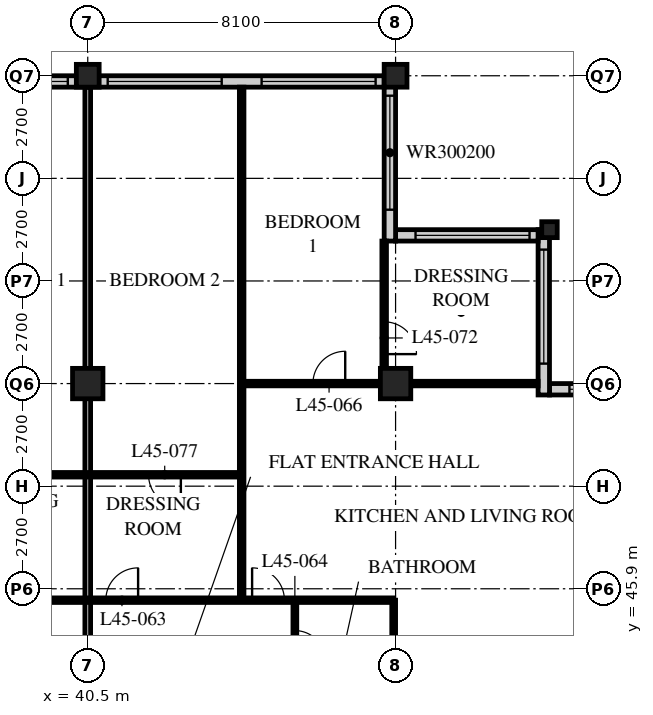
"""IFC4 building model, lengths in metres.
Left out: names, types, materials, properties, quantities, classifications, styles, units other than length and angle.
Written with IfcOpenShell. Run it as: python <this file> out.ifc"""

import sys

from ifc_helpers import new_model, si_unit, direction, frame, frame_2d, origin, origin_2d, place, context, subcontext, project, spatial, rectangle, hollow_rectangle, i_section, extrude, element, fill, save


model = new_model("IFC4")
c1 = context("Model", 3, precision=1e-05, world=origin(), true_north=direction((0.0, 1.0)))
c2 = subcontext(c1, "Body", "Model", "MODEL_VIEW")
j1 = project(units=[si_unit("LENGTHUNIT", "METRE"), si_unit("PLANEANGLEUNIT", "RADIAN")], contexts=[c1])
p1 = place(None, origin())
s1 = spatial("IfcSite", under=j1, at=p1, CompositionType="ELEMENT")
p2 = place(p1, origin())
s2 = spatial("IfcBuilding", under=s1, at=p2, CompositionType="ELEMENT")
p3 = place(p2, frame((0.0, 0.0, 177.6)))
s3 = spatial("IfcBuildingStorey", under=s2, at=p3, CompositionType="ELEMENT", Elevation=177.6)
p4 = place(p3, frame((40.5, 51.3, 0.0), z_axis=(0.0, 0.0, 1.0), x_axis=(1.0, 0.0, 0.0)))
e1 = element("IfcColumn", 1, at=p4, inside=s3, PredefinedType="COLUMN", context=c2, shape_type="SweptSolid", body=[
    extrude(hollow_rectangle(XDim=0.8, YDim=0.8, WallThickness=0.08, at=origin_2d()), origin(), (0.0, 0.0, 1.0), 3.6),
])
p5 = place(p3, frame((40.5, 59.4, 0.0), z_axis=(0.0, 0.0, 1.0), x_axis=(1.0, 0.0, 0.0)))
e2 = element("IfcColumn", 2, at=p5, inside=s3, PredefinedType="COLUMN", context=c2, shape_type="SweptSolid", body=[
    extrude(hollow_rectangle(XDim=0.6, YDim=0.6, WallThickness=0.05, at=origin_2d()), origin(), (0.0, 0.0, 1.0), 3.6),
])
p6 = place(p3, frame((48.6, 51.3, 0.0), z_axis=(0.0, 0.0, 1.0), x_axis=(1.0, 0.0, 0.0)))
e3 = element("IfcColumn", 3, at=p6, inside=s3, PredefinedType="COLUMN", context=c2, shape_type="SweptSolid", body=[
    extrude(hollow_rectangle(XDim=0.8, YDim=0.8, WallThickness=0.08, at=origin_2d()), origin(), (0.0, 0.0, 1.0), 3.6),
])
p7 = place(p3, frame((48.6, 59.4, 0.0), z_axis=(0.0, 0.0, 1.0), x_axis=(1.0, 0.0, 0.0)))
e4 = element("IfcColumn", 4, at=p7, inside=s3, PredefinedType="COLUMN", context=c2, shape_type="SweptSolid", body=[
    extrude(hollow_rectangle(XDim=0.6, YDim=0.6, WallThickness=0.05, at=origin_2d()), origin(), (0.0, 0.0, 1.0), 3.6),
])
p8 = place(p3, frame((52.65, 55.35, 0.0), z_axis=(0.0, 0.0, 1.0), x_axis=(1.0, 0.0, 0.0)))
e5 = element("IfcColumn", 5, at=p8, inside=s3, PredefinedType="COLUMN", context=c2, shape_type="SweptSolid", body=[
    extrude(i_section(OverallWidth=0.407, OverallDepth=0.419, WebThickness=0.031, FlangeThickness=0.049, FilletRadius=0.015, at=origin_2d()), origin(), (0.0, 0.0, 1.0), 3.6),
])
p9 = place(p3, frame((56.4, 51.15, 0.0), z_axis=(0.0, 0.0, 1.0), x_axis=(-1.0, 0.0, 0.0)))
e6 = element("IfcWall", 6, at=p9, inside=s3, PredefinedType="SOLIDWALL", context=c2, shape_type="SweptSolid", body=[
    extrude(rectangle(XDim=3.75, YDim=0.3, at=frame_2d((1.875, 0.0))), origin(), (0.0, 0.0, 1.0), 3.39),
])
p10 = place(p9, frame((0.225, 0.0, 0.6)))
e7 = element("IfcOpeningElement", 7, at=p10, cuts=e6, PredefinedType="OPENING", context=c2, shape_type="SweptSolid", body=[
    extrude(rectangle(XDim=3.0, YDim=2.0, at=frame_2d((1.5, 1.0))), frame((0.0, 0.16, 0.0), z_axis=(0.0, -1.0, 0.0), x_axis=(1.0, 0.0, 0.0)), (0.0, 0.0, 1.0), 0.32),
])
p11 = place(p3, frame((52.5, 51.0, 0.0), z_axis=(0.0, 0.0, 1.0), x_axis=(0.0, 1.0, 0.0)))
e8 = element("IfcWall", 8, at=p11, inside=s3, PredefinedType="SOLIDWALL", context=c2, shape_type="SweptSolid", body=[
    extrude(rectangle(XDim=4.35, YDim=0.3, at=frame_2d((2.175, 0.0))), origin(), (0.0, 0.0, 1.0), 3.39),
])
p12 = place(p11, frame((0.825, 0.0, 0.6)))
e9 = element("IfcOpeningElement", 9, at=p12, cuts=e8, PredefinedType="OPENING", context=c2, shape_type="SweptSolid", body=[
    extrude(rectangle(XDim=3.0, YDim=2.0, at=frame_2d((1.5, 1.0))), frame((0.0, 0.16, 0.0), z_axis=(0.0, -1.0, 0.0), x_axis=(1.0, 0.0, 0.0)), (0.0, 0.0, 1.0), 0.32),
])
p13 = place(p3, frame((52.35, 55.2, 0.0), z_axis=(0.0, 0.0, 1.0), x_axis=(-1.0, 0.0, 0.0)))
e10 = element("IfcWall", 10, at=p13, inside=s3, PredefinedType="SOLIDWALL", context=c2, shape_type="SweptSolid", body=[
    extrude(rectangle(XDim=3.75, YDim=0.3, at=frame_2d((1.875, 0.0))), origin(), (0.0, 0.0, 1.0), 3.39),
])
p14 = place(p13, frame((0.225, 0.0, 0.6)))
e11 = element("IfcOpeningElement", 11, at=p14, cuts=e10, PredefinedType="OPENING", context=c2, shape_type="SweptSolid", body=[
    extrude(rectangle(XDim=3.0, YDim=2.0, at=frame_2d((1.5, 1.0))), frame((0.0, 0.16, 0.0), z_axis=(0.0, -1.0, 0.0), x_axis=(1.0, 0.0, 0.0)), (0.0, 0.0, 1.0), 0.32),
])
p15 = place(p3, frame((48.45, 55.05, 0.0), z_axis=(0.0, 0.0, 1.0), x_axis=(0.0, 1.0, 0.0)))
e12 = element("IfcWall", 12, at=p15, inside=s3, PredefinedType="SOLIDWALL", context=c2, shape_type="SweptSolid", body=[
    extrude(rectangle(XDim=4.35, YDim=0.3, at=frame_2d((2.175, 0.0))), origin(), (0.0, 0.0, 1.0), 3.39),
])
p16 = place(p15, frame((0.825, 0.0, 0.6)))
e13 = element("IfcOpeningElement", 13, at=p16, cuts=e12, PredefinedType="OPENING", context=c2, shape_type="SweptSolid", body=[
    extrude(rectangle(XDim=3.0, YDim=2.0, at=frame_2d((1.5, 1.0))), frame((0.0, 0.16, 0.0), z_axis=(0.0, -1.0, 0.0), x_axis=(1.0, 0.0, 0.0)), (0.0, 0.0, 1.0), 0.32),
])
p17 = place(p3, frame((48.3, 59.25, 0.0), z_axis=(0.0, 0.0, 1.0), x_axis=(-1.0, 0.0, 0.0)))
e14 = element("IfcWall", 14, at=p17, inside=s3, PredefinedType="SOLIDWALL", context=c2, shape_type="SweptSolid", body=[
    extrude(rectangle(XDim=40.2, YDim=0.3, at=frame_2d((20.1, 0.0))), origin(), (0.0, 0.0, 1.0), 3.39),
])
p18 = place(p17, frame((0.225, 0.0, 0.6)))
e15 = element("IfcOpeningElement", 15, at=p18, cuts=e14, PredefinedType="OPENING", context=c2, shape_type="SweptSolid", body=[
    extrude(rectangle(XDim=3.0, YDim=2.4, at=frame_2d((1.5, 1.2))), frame((0.0, 0.16, 0.0), z_axis=(0.0, -1.0, 0.0), x_axis=(1.0, 0.0, 0.0)), (0.0, 0.0, 1.0), 0.32),
])
p19 = place(p17, frame((4.275, 0.0, 0.6)))
e16 = element("IfcOpeningElement", 16, at=p19, cuts=e14, PredefinedType="OPENING", context=c2, shape_type="SweptSolid", body=[
    extrude(rectangle(XDim=3.0, YDim=2.4, at=frame_2d((1.5, 1.2))), frame((0.0, 0.16, 0.0), z_axis=(0.0, -1.0, 0.0), x_axis=(1.0, 0.0, 0.0)), (0.0, 0.0, 1.0), 0.32),
])
p20 = place(p17, frame((8.325, 0.0, 0.6)))
e17 = element("IfcOpeningElement", 17, at=p20, cuts=e14, PredefinedType="OPENING", context=c2, shape_type="SweptSolid", body=[
    extrude(rectangle(XDim=3.0, YDim=2.4, at=frame_2d((1.5, 1.2))), frame((0.0, 0.16, 0.0), z_axis=(0.0, -1.0, 0.0), x_axis=(1.0, 0.0, 0.0)), (0.0, 0.0, 1.0), 0.32),
])
p21 = place(p17, frame((12.375, 0.0, 0.6)))
e18 = element("IfcOpeningElement", 18, at=p21, cuts=e14, PredefinedType="OPENING", context=c2, shape_type="SweptSolid", body=[
    extrude(rectangle(XDim=3.0, YDim=2.4, at=frame_2d((1.5, 1.2))), frame((0.0, 0.16, 0.0), z_axis=(0.0, -1.0, 0.0), x_axis=(1.0, 0.0, 0.0)), (0.0, 0.0, 1.0), 0.32),
])
p22 = place(p17, frame((16.425, 0.0, 0.6)))
e19 = element("IfcOpeningElement", 19, at=p22, cuts=e14, PredefinedType="OPENING", context=c2, shape_type="SweptSolid", body=[
    extrude(rectangle(XDim=3.0, YDim=2.4, at=frame_2d((1.5, 1.2))), frame((0.0, 0.16, 0.0), z_axis=(0.0, -1.0, 0.0), x_axis=(1.0, 0.0, 0.0)), (0.0, 0.0, 1.0), 0.32),
])
p23 = place(p17, frame((20.475, 0.0, 0.6)))
e20 = element("IfcOpeningElement", 20, at=p23, cuts=e14, PredefinedType="OPENING", context=c2, shape_type="SweptSolid", body=[
    extrude(rectangle(XDim=3.0, YDim=2.4, at=frame_2d((1.5, 1.2))), frame((0.0, 0.16, 0.0), z_axis=(0.0, -1.0, 0.0), x_axis=(1.0, 0.0, 0.0)), (0.0, 0.0, 1.0), 0.32),
])
p24 = place(p17, frame((24.525, 0.0, 0.6)))
e21 = element("IfcOpeningElement", 21, at=p24, cuts=e14, PredefinedType="OPENING", context=c2, shape_type="SweptSolid", body=[
    extrude(rectangle(XDim=3.0, YDim=2.4, at=frame_2d((1.5, 1.2))), frame((0.0, 0.16, 0.0), z_axis=(0.0, -1.0, 0.0), x_axis=(1.0, 0.0, 0.0)), (0.0, 0.0, 1.0), 0.32),
])
p25 = place(p17, frame((28.575, 0.0, 0.6)))
e22 = element("IfcOpeningElement", 22, at=p25, cuts=e14, PredefinedType="OPENING", context=c2, shape_type="SweptSolid", body=[
    extrude(rectangle(XDim=3.0, YDim=2.4, at=frame_2d((1.5, 1.2))), frame((0.0, 0.16, 0.0), z_axis=(0.0, -1.0, 0.0), x_axis=(1.0, 0.0, 0.0)), (0.0, 0.0, 1.0), 0.32),
])
p26 = place(p17, frame((32.625, 0.0, 0.6)))
e23 = element("IfcOpeningElement", 23, at=p26, cuts=e14, PredefinedType="OPENING", context=c2, shape_type="SweptSolid", body=[
    extrude(rectangle(XDim=3.0, YDim=2.4, at=frame_2d((1.5, 1.2))), frame((0.0, 0.16, 0.0), z_axis=(0.0, -1.0, 0.0), x_axis=(1.0, 0.0, 0.0)), (0.0, 0.0, 1.0), 0.32),
])
p27 = place(p17, frame((36.675, 0.0, 0.6)))
e24 = element("IfcOpeningElement", 24, at=p27, cuts=e14, PredefinedType="OPENING", context=c2, shape_type="SweptSolid", body=[
    extrude(rectangle(XDim=3.0, YDim=2.4, at=frame_2d((1.5, 1.2))), frame((0.0, 0.16, 0.0), z_axis=(0.0, -1.0, 0.0), x_axis=(1.0, 0.0, 0.0)), (0.0, 0.0, 1.0), 0.32),
])
p28 = place(p3, frame((45.95, 43.2, 0.0), z_axis=(0.0, 0.0, 1.0), x_axis=(0.0, 1.0, 0.0)))
e25 = element("IfcWall", 25, at=p28, inside=s3, PredefinedType="PARTITIONING", context=c2, shape_type="SweptSolid", body=[
    extrude(rectangle(XDim=2.4, YDim=0.1, at=frame_2d((1.2, 0.0))), origin(), (0.0, 0.0, 1.0), 3.39),
])
p29 = place(p28, frame((0.8, 0.0, 0.0)))
e26 = element("IfcOpeningElement", 26, at=p29, cuts=e25, PredefinedType="OPENING", context=c2, shape_type="SweptSolid", body=[
    extrude(rectangle(XDim=0.8, YDim=2.1, at=frame_2d((0.4, 1.05))), frame((0.0, 0.06, 0.0), z_axis=(0.0, -1.0, 0.0), x_axis=(1.0, 0.0, 0.0)), (0.0, 0.0, 1.0), 0.12),
])
p30 = place(p3, frame((48.55, 43.2, 0.0), z_axis=(0.0, 0.0, 1.0), x_axis=(0.0, 1.0, 0.0)))
e27 = element("IfcWall", 27, at=p30, inside=s3, PredefinedType="PARTITIONING", context=c2, shape_type="SweptSolid", body=[
    extrude(rectangle(XDim=2.4, YDim=0.1, at=frame_2d((1.2, 0.0))), origin(), (0.0, 0.0, 1.0), 2.778),
])
p31 = place(p3, frame((44.55, 45.6, 0.0), z_axis=(0.0, 0.0, 1.0), x_axis=(0.0, 1.0, 0.0)))
e28 = element("IfcWall", 28, at=p31, inside=s3, PredefinedType="PARTITIONING", context=c2, shape_type="SweptSolid", body=[
    extrude(rectangle(XDim=13.5, YDim=0.12, at=frame_2d((6.75, 0.0))), origin(), (0.0, 0.0, 1.0), 3.39),
])
p32 = place(p3, frame((44.55, 51.3, 0.0), z_axis=(0.0, 0.0, 1.0), x_axis=(1.0, 0.0, 0.0)))
e29 = element("IfcWall", 29, at=p32, inside=s3, PredefinedType="PARTITIONING", context=c2, shape_type="SweptSolid", body=[
    extrude(rectangle(XDim=7.8, YDim=0.12, at=frame_2d((3.9, 0.0))), origin(), (0.0, 0.0, 1.0), 2.778),
])
p33 = place(p32, frame((1.875, 0.0, 0.0)))
e30 = element("IfcOpeningElement", 30, at=p33, cuts=e29, PredefinedType="OPENING", context=c2, shape_type="SweptSolid", body=[
    extrude(rectangle(XDim=0.85, YDim=2.1, at=frame_2d((0.425, 1.05))), frame((0.0, 0.07, 0.0), z_axis=(0.0, -1.0, 0.0), x_axis=(1.0, 0.0, 0.0)), (0.0, 0.0, 1.0), 0.14),
])
p34 = place(p3, frame((40.5, 43.2, 0.0), z_axis=(0.0, 0.0, 1.0), x_axis=(0.0, 1.0, 0.0)))
e31 = element("IfcWall", 31, at=p34, inside=s3, PredefinedType="PARTITIONING", context=c2, shape_type="SweptSolid", body=[
    extrude(rectangle(XDim=15.9, YDim=0.15, at=frame_2d((7.95, 0.0))), origin(), (0.0, 0.0, 1.0), 2.778),
])
p35 = place(p3, frame((8.15, 45.6, 0.0), z_axis=(0.0, 0.0, 1.0), x_axis=(1.0, 0.0, 0.0)))
e32 = element("IfcWall", 32, at=p35, inside=s3, PredefinedType="PARTITIONING", context=c2, shape_type="SweptSolid", body=[
    extrude(rectangle(XDim=40.4, YDim=0.12, at=frame_2d((20.2, 0.0))), origin(), (0.0, 0.0, 1.0), 3.39),
])
p36 = place(p35, frame((9.025, 0.0, 0.0)))
e33 = element("IfcOpeningElement", 33, at=p36, cuts=e32, PredefinedType="OPENING", context=c2, shape_type="SweptSolid", body=[
    extrude(rectangle(XDim=0.85, YDim=2.1, at=frame_2d((0.425, 1.05))), frame((0.0, 0.07, 0.0), z_axis=(0.0, -1.0, 0.0), x_axis=(1.0, 0.0, 0.0)), (0.0, 0.0, 1.0), 0.14),
])
p37 = place(p35, frame((12.425, 0.0, 0.0)))
e34 = element("IfcOpeningElement", 34, at=p37, cuts=e32, PredefinedType="OPENING", context=c2, shape_type="SweptSolid", body=[
    extrude(rectangle(XDim=0.85, YDim=2.1, at=frame_2d((0.425, 1.05))), frame((0.0, 0.07, 0.0), z_axis=(0.0, -1.0, 0.0), x_axis=(1.0, 0.0, 0.0)), (0.0, 0.0, 1.0), 0.14),
])
p38 = place(p35, frame((17.125, 0.0, 0.0)))
e35 = element("IfcOpeningElement", 35, at=p38, cuts=e32, PredefinedType="OPENING", context=c2, shape_type="SweptSolid", body=[
    extrude(rectangle(XDim=0.85, YDim=2.1, at=frame_2d((0.425, 1.05))), frame((0.0, 0.07, 0.0), z_axis=(0.0, -1.0, 0.0), x_axis=(1.0, 0.0, 0.0)), (0.0, 0.0, 1.0), 0.14),
])
p39 = place(p35, frame((20.525, 0.0, 0.0)))
e36 = element("IfcOpeningElement", 36, at=p39, cuts=e32, PredefinedType="OPENING", context=c2, shape_type="SweptSolid", body=[
    extrude(rectangle(XDim=0.85, YDim=2.1, at=frame_2d((0.425, 1.05))), frame((0.0, 0.07, 0.0), z_axis=(0.0, -1.0, 0.0), x_axis=(1.0, 0.0, 0.0)), (0.0, 0.0, 1.0), 0.14),
])
p40 = place(p35, frame((25.225, 0.0, 0.0)))
e37 = element("IfcOpeningElement", 37, at=p40, cuts=e32, PredefinedType="OPENING", context=c2, shape_type="SweptSolid", body=[
    extrude(rectangle(XDim=0.85, YDim=2.1, at=frame_2d((0.425, 1.05))), frame((0.0, 0.07, 0.0), z_axis=(0.0, -1.0, 0.0), x_axis=(1.0, 0.0, 0.0)), (0.0, 0.0, 1.0), 0.14),
])
p41 = place(p35, frame((28.625, 0.0, 0.0)))
e38 = element("IfcOpeningElement", 38, at=p41, cuts=e32, PredefinedType="OPENING", context=c2, shape_type="SweptSolid", body=[
    extrude(rectangle(XDim=0.85, YDim=2.1, at=frame_2d((0.425, 1.05))), frame((0.0, 0.07, 0.0), z_axis=(0.0, -1.0, 0.0), x_axis=(1.0, 0.0, 0.0)), (0.0, 0.0, 1.0), 0.14),
])
p42 = place(p35, frame((32.825, 0.0, 0.0)))
e39 = element("IfcOpeningElement", 39, at=p42, cuts=e32, PredefinedType="OPENING", context=c2, shape_type="SweptSolid", body=[
    extrude(rectangle(XDim=0.85, YDim=2.1, at=frame_2d((0.425, 1.05))), frame((0.0, 0.07, 0.0), z_axis=(0.0, -1.0, 0.0), x_axis=(1.0, 0.0, 0.0)), (0.0, 0.0, 1.0), 0.14),
])
p43 = place(p35, frame((36.675, 0.0, 0.0)))
e40 = element("IfcOpeningElement", 40, at=p43, cuts=e32, PredefinedType="OPENING", context=c2, shape_type="SweptSolid", body=[
    extrude(rectangle(XDim=0.85, YDim=2.1, at=frame_2d((0.425, 1.05))), frame((0.0, 0.07, 0.0), z_axis=(0.0, -1.0, 0.0), x_axis=(1.0, 0.0, 0.0)), (0.0, 0.0, 1.0), 0.14),
])
p44 = place(p35, frame((6.725, 0.0, 0.0)))
e41 = element("IfcOpeningElement", 41, at=p44, cuts=e32, PredefinedType="OPENING", context=c2, shape_type="SweptSolid", body=[
    extrude(rectangle(XDim=0.85, YDim=2.1, at=frame_2d((0.425, 1.05))), frame((0.0, 0.07, 0.0), z_axis=(0.0, -1.0, 0.0), x_axis=(1.0, 0.0, 0.0)), (0.0, 0.0, 1.0), 0.14),
])
p45 = place(p35, frame((2.875, 0.0, 0.0)))
e42 = element("IfcOpeningElement", 42, at=p45, cuts=e32, PredefinedType="OPENING", context=c2, shape_type="SweptSolid", body=[
    extrude(rectangle(XDim=0.85, YDim=2.1, at=frame_2d((0.425, 1.05))), frame((0.0, 0.07, 0.0), z_axis=(0.0, -1.0, 0.0), x_axis=(1.0, 0.0, 0.0)), (0.0, 0.0, 1.0), 0.14),
])
p46 = place(p3, frame((48.3, 51.3, 0.0), z_axis=(0.0, 0.0, 1.0), x_axis=(0.0, 1.0, 0.0)))
e43 = element("IfcWall", 43, at=p46, inside=s3, PredefinedType="PARTITIONING", context=c2, shape_type="SweptSolid", body=[
    extrude(rectangle(XDim=3.75, YDim=0.12, at=frame_2d((1.875, 0.0))), origin(), (0.0, 0.0, 1.0), 3.39),
])
p47 = place(p46, frame((0.775, 0.0, 0.0)))
e44 = element("IfcOpeningElement", 44, at=p47, cuts=e43, PredefinedType="OPENING", context=c2, shape_type="SweptSolid", body=[
    extrude(rectangle(XDim=0.85, YDim=2.1, at=frame_2d((0.425, 1.05))), frame((0.0, 0.07, 0.0), z_axis=(0.0, -1.0, 0.0), x_axis=(1.0, 0.0, 0.0)), (0.0, 0.0, 1.0), 0.14),
])
p48 = place(p3, frame((36.45, 48.9, 0.0), z_axis=(0.0, 0.0, 1.0), x_axis=(1.0, 0.0, 0.0)))
e45 = element("IfcWall", 45, at=p48, inside=s3, PredefinedType="PARTITIONING", context=c2, shape_type="SweptSolid", body=[
    extrude(rectangle(XDim=8.1, YDim=0.12, at=frame_2d((4.05, 0.0))), origin(), (0.0, 0.0, 1.0), 3.39),
])
p49 = place(p48, frame((1.6, 0.0, 0.0)))
e46 = element("IfcOpeningElement", 46, at=p49, cuts=e45, PredefinedType="OPENING", context=c2, shape_type="SweptSolid", body=[
    extrude(rectangle(XDim=0.85, YDim=2.1, at=frame_2d((0.425, 1.05))), frame((0.0, 0.07, 0.0), z_axis=(0.0, -1.0, 0.0), x_axis=(1.0, 0.0, 0.0)), (0.0, 0.0, 1.0), 0.14),
])
p50 = place(p48, frame((5.65, 0.0, 0.0)))
e47 = element("IfcOpeningElement", 47, at=p50, cuts=e45, PredefinedType="OPENING", context=c2, shape_type="SweptSolid", body=[
    extrude(rectangle(XDim=0.85, YDim=2.1, at=frame_2d((0.425, 1.05))), frame((0.0, 0.07, 0.0), z_axis=(0.0, -1.0, 0.0), x_axis=(1.0, 0.0, 0.0)), (0.0, 0.0, 1.0), 0.14),
])
p51 = place(p10, origin())
e48 = element("IfcWindow", 48, at=p51, inside=s3, PartitioningType="SINGLE_PANEL", PredefinedType="WINDOW", context=c2, shape_type="SweptSolid", body=[
    extrude(rectangle(XDim=3.0, YDim=2.0, at=frame_2d((1.5, 1.0))), frame((0.0, 0.03, 0.0), z_axis=(0.0, -1.0, 0.0), x_axis=(1.0, 0.0, 0.0)), (0.0, 0.0, 1.0), 0.06),
])
fill(e7, e48)
p52 = place(p12, origin())
e49 = element("IfcWindow", 49, at=p52, inside=s3, PartitioningType="SINGLE_PANEL", PredefinedType="WINDOW", context=c2, shape_type="SweptSolid", body=[
    extrude(rectangle(XDim=3.0, YDim=2.0, at=frame_2d((1.5, 1.0))), frame((0.0, 0.03, 0.0), z_axis=(0.0, -1.0, 0.0), x_axis=(1.0, 0.0, 0.0)), (0.0, 0.0, 1.0), 0.06),
])
fill(e9, e49)
p53 = place(p14, origin())
e50 = element("IfcWindow", 50, at=p53, inside=s3, PartitioningType="SINGLE_PANEL", PredefinedType="WINDOW", context=c2, shape_type="SweptSolid", body=[
    extrude(rectangle(XDim=3.0, YDim=2.0, at=frame_2d((1.5, 1.0))), frame((0.0, 0.03, 0.0), z_axis=(0.0, -1.0, 0.0), x_axis=(1.0, 0.0, 0.0)), (0.0, 0.0, 1.0), 0.06),
])
fill(e11, e50)
p54 = place(p16, origin())
e51 = element("IfcWindow", 51, at=p54, inside=s3, PartitioningType="SINGLE_PANEL", PredefinedType="WINDOW", context=c2, shape_type="SweptSolid", body=[
    extrude(rectangle(XDim=3.0, YDim=2.0, at=frame_2d((1.5, 1.0))), frame((0.0, 0.03, 0.0), z_axis=(0.0, -1.0, 0.0), x_axis=(1.0, 0.0, 0.0)), (0.0, 0.0, 1.0), 0.06),
])
fill(e13, e51)
p55 = place(p18, origin())
e52 = element("IfcWindow", 52, at=p55, inside=s3, PartitioningType="SINGLE_PANEL", PredefinedType="WINDOW", context=c2, shape_type="SweptSolid", body=[
    extrude(rectangle(XDim=3.0, YDim=2.4, at=frame_2d((1.5, 1.2))), frame((0.0, 0.03, 0.0), z_axis=(0.0, -1.0, 0.0), x_axis=(1.0, 0.0, 0.0)), (0.0, 0.0, 1.0), 0.06),
])
fill(e15, e52)
p56 = place(p19, origin())
e53 = element("IfcWindow", 53, at=p56, inside=s3, PartitioningType="SINGLE_PANEL", PredefinedType="WINDOW", context=c2, shape_type="SweptSolid", body=[
    extrude(rectangle(XDim=3.0, YDim=2.4, at=frame_2d((1.5, 1.2))), frame((0.0, 0.03, 0.0), z_axis=(0.0, -1.0, 0.0), x_axis=(1.0, 0.0, 0.0)), (0.0, 0.0, 1.0), 0.06),
])
fill(e16, e53)
p57 = place(p20, origin())
e54 = element("IfcWindow", 54, at=p57, inside=s3, PartitioningType="SINGLE_PANEL", PredefinedType="WINDOW", context=c2, shape_type="SweptSolid", body=[
    extrude(rectangle(XDim=3.0, YDim=2.4, at=frame_2d((1.5, 1.2))), frame((0.0, 0.03, 0.0), z_axis=(0.0, -1.0, 0.0), x_axis=(1.0, 0.0, 0.0)), (0.0, 0.0, 1.0), 0.06),
])
fill(e17, e54)
p58 = place(p42, origin())
e55 = element("IfcDoor", 55, at=p58, inside=s3, OperationType="SINGLE_SWING_RIGHT", PredefinedType="DOOR", context=c2, shape_type="SweptSolid", body=[
    extrude(rectangle(XDim=0.85, YDim=2.1, at=frame_2d((0.425, 1.05))), frame((0.0, 0.025, 0.0), z_axis=(0.0, -1.0, 0.0), x_axis=(1.0, 0.0, 0.0)), (0.0, 0.0, 1.0), 0.05),
])
fill(e39, e55)
p59 = place(p29, origin())
e56 = element("IfcDoor", 56, at=p59, inside=s3, OperationType="SINGLE_SWING_RIGHT", PredefinedType="DOOR", context=c2, shape_type="SweptSolid", body=[
    extrude(rectangle(XDim=0.8, YDim=2.1, at=frame_2d((0.4, 1.05))), frame((0.0, 0.025, 0.0), z_axis=(0.0, -1.0, 0.0), x_axis=(1.0, 0.0, 0.0)), (0.0, 0.0, 1.0), 0.05),
])
fill(e26, e56)
p60 = place(p43, origin())
e57 = element("IfcDoor", 57, at=p60, inside=s3, OperationType="SINGLE_SWING_LEFT", PredefinedType="DOOR", context=c2, shape_type="SweptSolid", body=[
    extrude(rectangle(XDim=0.85, YDim=2.1, at=frame_2d((0.425, 1.05))), frame((0.0, 0.025, 0.0), z_axis=(0.0, -1.0, 0.0), x_axis=(1.0, 0.0, 0.0)), (0.0, 0.0, 1.0), 0.05),
])
fill(e40, e57)
p61 = place(p33, origin())
e58 = element("IfcDoor", 58, at=p61, inside=s3, OperationType="SINGLE_SWING_RIGHT", PredefinedType="DOOR", context=c2, shape_type="SweptSolid", body=[
    extrude(rectangle(XDim=0.85, YDim=2.1, at=frame_2d((0.425, 1.05))), frame((0.0, 0.025, 0.0), z_axis=(0.0, -1.0, 0.0), x_axis=(1.0, 0.0, 0.0)), (0.0, 0.0, 1.0), 0.05),
])
fill(e30, e58)
p62 = place(p47, origin())
e59 = element("IfcDoor", 59, at=p62, inside=s3, OperationType="SINGLE_SWING_RIGHT", PredefinedType="DOOR", context=c2, shape_type="SweptSolid", body=[
    extrude(rectangle(XDim=0.85, YDim=2.1, at=frame_2d((0.425, 1.05))), frame((0.0, 0.025, 0.0), z_axis=(0.0, -1.0, 0.0), x_axis=(1.0, 0.0, 0.0)), (0.0, 0.0, 1.0), 0.05),
])
fill(e44, e59)
p63 = place(p50, origin())
e60 = element("IfcDoor", 60, at=p63, inside=s3, OperationType="SINGLE_SWING_LEFT", PredefinedType="DOOR", context=c2, shape_type="SweptSolid", body=[
    extrude(rectangle(XDim=0.85, YDim=2.1, at=frame_2d((0.425, 1.05))), frame((0.0, 0.025, 0.0), z_axis=(0.0, -1.0, 0.0), x_axis=(1.0, 0.0, 0.0)), (0.0, 0.0, 1.0), 0.05),
])
fill(e47, e60)
save(model, sys.argv[1])
